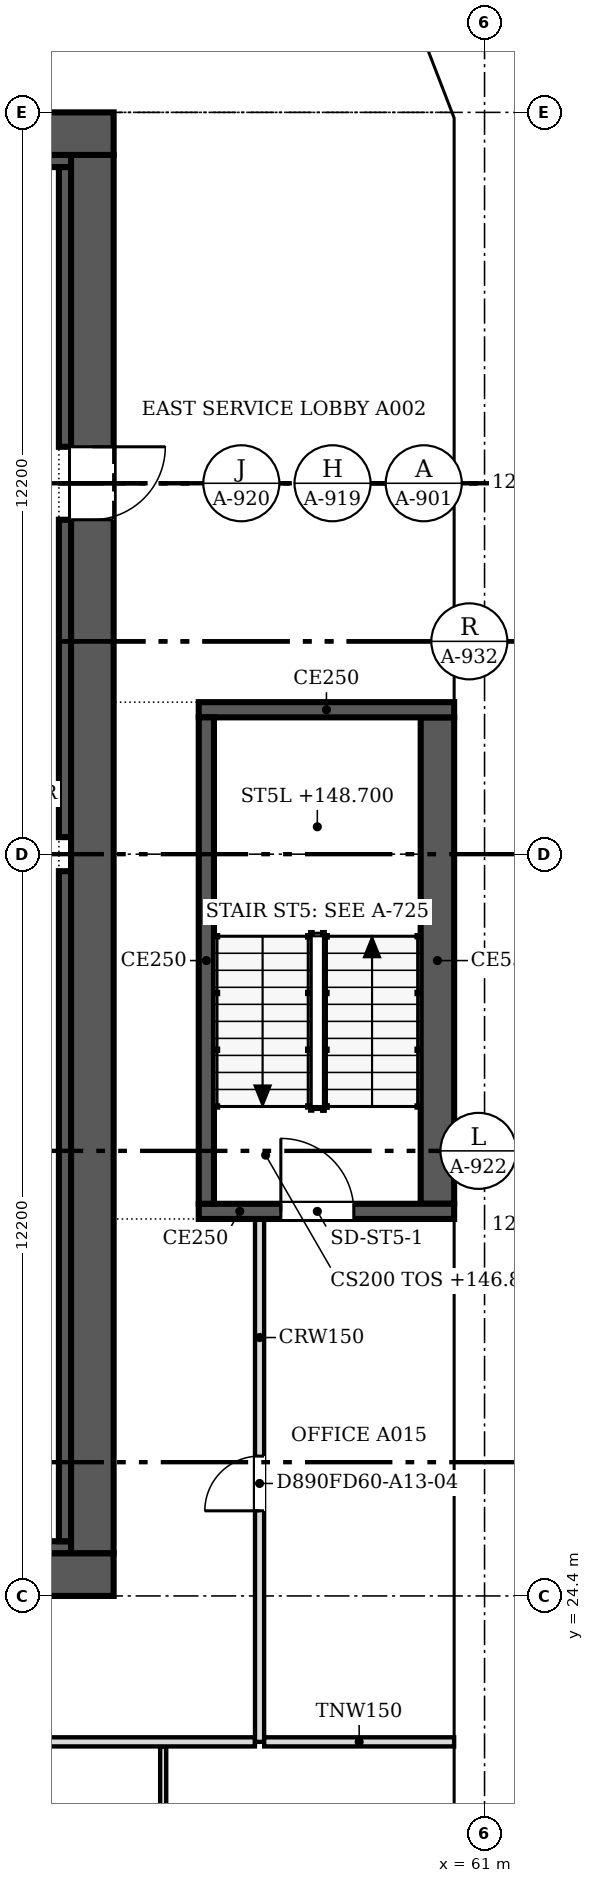
"""IFC4 building model, lengths in metres.
Left out: names, types, materials, properties, quantities, classifications, styles, units other than length and angle.
Written with IfcOpenShell. Run it as: python <this file> out.ifc"""

import sys

from ifc_helpers import new_model, si_unit, direction, frame, frame_2d, origin, place, context, subcontext, project, spatial, polyline, rectangle, outline, extrude, faceted_brep, source, transform, mapped, element, fill, save


model = new_model("IFC4")
c1 = context("Model", 3, precision=1e-05, world=origin(), true_north=direction((0.0, 1.0)))
c2 = subcontext(c1, "Body", "Model", "MODEL_VIEW")
j1 = project(units=[si_unit("LENGTHUNIT", "METRE"), si_unit("PLANEANGLEUNIT", "RADIAN")], contexts=[c1])
p1 = place(None, origin())
s1 = spatial("IfcSite", under=j1, at=p1, CompositionType="ELEMENT")
p2 = place(p1, origin())
s2 = spatial("IfcBuilding", under=s1, at=p2, CompositionType="ELEMENT")
p3 = place(p2, frame((0.0, 0.0, 146.8)))
s3 = spatial("IfcBuildingStorey", under=s2, at=p3, CompositionType="ELEMENT", Elevation=146.8)
m1 = source(origin(), c2, "Body", "SweptSolid", [
    extrude(outline(polyline([(3.05, 0.0), (6.1, 3.8), (3.05, 7.6), (0.0, 3.8), (3.05, 0.0)])), frame((0.0, 0.25, 0.0), z_axis=(0.0, -1.0, 0.0), x_axis=(1.0, 0.0, 0.0)), (0.0, 0.0, 1.0), 0.5),
])
p4 = place(p3, frame((60.75, 15.25, -3.8), z_axis=(0.0, 0.0, 1.0), x_axis=(0.0, 1.0, 0.0)))
e1 = element("IfcWall", 1, at=p4, inside=s3, PredefinedType="SOLIDWALL", context=c2, shape_type="MappedRepresentation", body=[
    mapped(m1, transform((0.0, 0.0, 0.0), scale=1.0)),
])
m2 = source(origin(), c2, "Body", "SweptSolid", [
    extrude(outline(polyline([(3.05, 0.399), (5.78, 3.8), (3.05, 7.201), (0.321, 3.8), (3.05, 0.399)])), frame((0.0, 0.26, 0.0), z_axis=(0.0, -1.0, 0.0), x_axis=(1.0, 0.0, 0.0)), (0.0, 0.0, 1.0), 0.52),
])
p5 = place(p4, origin())
e2 = element("IfcOpeningElement", 2, at=p5, cuts=e1, PredefinedType="OPENING", context=c2, shape_type="MappedRepresentation", body=[
    mapped(m2, transform((0.0, 0.0, 0.0), scale=1.0)),
])
m3 = source(origin(), c2, "Body", "Brep", [
    faceted_brep([(3.05, -0.25, 0.0), (6.1, -0.25, 3.8), (6.1, -0.25, 3.8), (3.05, -0.25, 7.6), (0.0, -0.25, 3.8), (0.0, 0.25, 3.8), (3.05, 0.25, 7.6), (6.1, 0.25, 3.8), (6.1, 0.25, 3.8), (3.05, 0.25, 0.0)], [[[0, 1, 2, 3, 4]], [[5, 6, 7, 8, 9]], [[9, 8, 1, 0]], [[7, 6, 3, 2]], [[6, 5, 4, 3]], [[5, 9, 0, 4]], [[1, 8, 7, 2]]]),
])
p6 = place(p3, frame((60.75, 21.35, -3.8), z_axis=(0.0, 0.0, 1.0), x_axis=(0.0, 1.0, 0.0)))
e3 = element("IfcWall", 3, at=p6, inside=s3, PredefinedType="SOLIDWALL", context=c2, shape_type="MappedRepresentation", body=[
    mapped(m3, transform((0.0, 0.0, 0.0), scale=1.0)),
])
p7 = place(p6, origin())
e4 = element("IfcOpeningElement", 4, at=p7, cuts=e3, PredefinedType="OPENING", context=c2, shape_type="MappedRepresentation", body=[
    mapped(m2, transform((0.0, 0.0, 0.0), scale=1.0)),
])
p8 = place(p3, frame((60.75, 27.45, -3.8), z_axis=(0.0, 0.0, 1.0), x_axis=(0.0, 1.0, 0.0)))
e5 = element("IfcWall", 5, at=p8, inside=s3, PredefinedType="SOLIDWALL", context=c2, shape_type="MappedRepresentation", body=[
    mapped(m1, transform((0.0, 0.0, 0.0), scale=1.0)),
])
p9 = place(p8, origin())
e6 = element("IfcOpeningElement", 6, at=p9, cuts=e5, PredefinedType="OPENING", context=c2, shape_type="MappedRepresentation", body=[
    mapped(m2, transform((0.0, 0.0, 0.0), scale=1.0)),
])
p10 = place(p3, frame((60.75, 33.55, -3.8), z_axis=(0.0, 0.0, 1.0), x_axis=(0.0, 1.0, 0.0)))
e7 = element("IfcWall", 7, at=p10, inside=s3, PredefinedType="SOLIDWALL", context=c2, shape_type="MappedRepresentation", body=[
    mapped(m3, transform((0.0, 0.0, 0.0), scale=1.0)),
])
p11 = place(p10, origin())
e8 = element("IfcOpeningElement", 8, at=p11, cuts=e7, PredefinedType="OPENING", context=c2, shape_type="MappedRepresentation", body=[
    mapped(m2, transform((0.0, 0.0, 0.0), scale=1.0)),
])
p12 = place(p3, frame((60.75, 39.65, -3.8), z_axis=(0.0, 0.0, 1.0), x_axis=(0.0, 1.0, 0.0)))
e9 = element("IfcWall", 9, at=p12, inside=s3, PredefinedType="SOLIDWALL", context=c2, shape_type="MappedRepresentation", body=[
    mapped(m1, transform((0.0, 0.0, 0.0), scale=1.0)),
])
p13 = place(p12, origin())
e10 = element("IfcOpeningElement", 10, at=p13, cuts=e9, PredefinedType="OPENING", context=c2, shape_type="MappedRepresentation", body=[
    mapped(m2, transform((0.0, 0.0, 0.0), scale=1.0)),
])
m4 = source(origin(), c2, "Body", "Brep", [
    faceted_brep([(3.003, -0.25, 0.0), (3.05, -0.25, 0.06), (3.05, -0.25, 7.54), (3.003, -0.25, 7.6), (0.0, -0.25, 3.8), (0.0, 0.25, 3.8), (2.957, 0.25, 7.541), (2.957, 0.25, 0.059), (3.003, 0.0, 0.0), (3.003, 0.0, 7.6)], [[[0, 1, 2, 3, 4]], [[5, 6, 7]], [[1, 0, 8]], [[9, 3, 2]], [[6, 5, 4, 3, 9]], [[5, 7, 8, 0, 4]], [[1, 8, 7, 6, 9, 2]]]),
])
p14 = place(p3, frame((60.75, 45.75, -3.8), z_axis=(0.0, 0.0, 1.0), x_axis=(0.0, 1.0, 0.0)))
e11 = element("IfcWall", 11, at=p14, inside=s3, PredefinedType="SOLIDWALL", context=c2, shape_type="MappedRepresentation", body=[
    mapped(m4, transform((0.0, 0.0, 0.0), scale=1.0)),
])
m5 = source(origin(), c2, "Body", "SweptSolid", [
    extrude(outline(polyline([(2.803, 6.944), (0.319, 3.8), (2.803, 0.656), (2.803, 6.944)])), frame((0.0, 0.26, 0.0), z_axis=(0.0, -1.0, 0.0), x_axis=(1.0, 0.0, 0.0)), (0.0, 0.0, 1.0), 0.52),
])
p15 = place(p14, origin())
e12 = element("IfcOpeningElement", 12, at=p15, cuts=e11, PredefinedType="OPENING", context=c2, shape_type="MappedRepresentation", body=[
    mapped(m5, transform((0.0, 0.0, 0.0), scale=1.0)),
])
m6 = source(origin(), c2, "Body", "Brep", [
    faceted_brep([(0.047, -0.25, 0.0), (2.997, -0.25, 3.8), (0.047, -0.25, 7.6), (0.0, -0.25, 7.541), (0.0, -0.25, 0.059), (0.093, 0.25, 7.54), (2.944, 0.25, 3.868), (2.944, 0.25, 3.732), (0.093, 0.25, 0.06), (2.997, 0.0, 3.8), (0.047, 0.0, 0.0), (0.047, 0.0, 7.6)], [[[0, 1, 2, 3, 4]], [[5, 6, 7, 8]], [[8, 7, 9, 1, 0, 10]], [[6, 5, 11, 2, 1, 9]], [[3, 2, 11]], [[10, 0, 4]], [[8, 10, 4, 3, 11, 5]], [[9, 7, 6]]]),
])
p16 = place(p3, frame((60.767, 48.71, -3.8), z_axis=(0.0, 0.0, 1.0), x_axis=(-0.359901446078, 0.932990326376, 0.0)))
e13 = element("IfcWall", 13, at=p16, inside=s3, PredefinedType="SOLIDWALL", context=c2, shape_type="MappedRepresentation", body=[
    mapped(m6, transform((0.0, 0.0, 0.0), scale=1.0)),
])
m7 = source(origin(), c2, "Body", "SweptSolid", [
    extrude(outline(polyline([(0.247, 0.665), (2.681, 3.8), (0.247, 6.935), (0.247, 0.665)])), frame((0.0, 0.26, 0.0), z_axis=(0.0, -1.0, 0.0), x_axis=(1.0, 0.0, 0.0)), (0.0, 0.0, 1.0), 0.52),
])
p17 = place(p16, origin())
e14 = element("IfcOpeningElement", 14, at=p17, cuts=e13, PredefinedType="OPENING", context=c2, shape_type="MappedRepresentation", body=[
    mapped(m7, transform((0.0, 0.0, 0.0), scale=1.0)),
])
m8 = source(origin(), c2, "Body", "Brep", [
    faceted_brep([(3.05, -0.25, 0.0), (6.1, -0.25, 3.8), (6.1, -0.25, 3.8), (0.0, -0.25, 3.8), (0.0, 0.25, 3.8), (6.1, 0.25, 3.8), (6.1, 0.25, 3.8), (3.05, 0.25, 0.0)], [[[0, 1, 2, 3]], [[4, 5, 6, 7]], [[7, 6, 1, 0]], [[5, 4, 3, 2]], [[4, 7, 0, 3]], [[1, 6, 5, 2]]]),
])
p18 = place(p3, frame((60.75, 18.3, 0.0), z_axis=(0.0, 0.0, 1.0), x_axis=(0.0, 1.0, 0.0)))
e15 = element("IfcWall", 15, at=p18, inside=s3, PredefinedType="SOLIDWALL", context=c2, shape_type="MappedRepresentation", body=[
    mapped(m8, transform((0.0, 0.0, 0.0), scale=1.0)),
])
m9 = source(origin(), c2, "Body", "SweptSolid", [
    extrude(outline(polyline([(3.05, 0.399), (5.579, 3.55), (0.521, 3.55), (3.05, 0.399)])), frame((0.0, 0.26, 0.0), z_axis=(0.0, -1.0, 0.0), x_axis=(1.0, 0.0, 0.0)), (0.0, 0.0, 1.0), 0.52),
])
p19 = place(p18, origin())
e16 = element("IfcOpeningElement", 16, at=p19, cuts=e15, PredefinedType="OPENING", context=c2, shape_type="MappedRepresentation", body=[
    mapped(m9, transform((0.0, 0.0, 0.0), scale=1.0)),
])
m10 = source(origin(), c2, "Body", "SweptSolid", [
    extrude(outline(polyline([(3.05, 0.0), (6.1, 3.8), (0.0, 3.8), (3.05, 0.0)])), frame((0.0, 0.25, 0.0), z_axis=(0.0, -1.0, 0.0), x_axis=(1.0, 0.0, 0.0)), (0.0, 0.0, 1.0), 0.5),
])
p20 = place(p3, frame((60.75, 24.4, 0.0), z_axis=(0.0, 0.0, 1.0), x_axis=(0.0, 1.0, 0.0)))
e17 = element("IfcWall", 17, at=p20, inside=s3, PredefinedType="SOLIDWALL", context=c2, shape_type="MappedRepresentation", body=[
    mapped(m10, transform((0.0, 0.0, 0.0), scale=1.0)),
])
p21 = place(p20, origin())
e18 = element("IfcOpeningElement", 18, at=p21, cuts=e17, PredefinedType="OPENING", context=c2, shape_type="MappedRepresentation", body=[
    mapped(m9, transform((0.0, 0.0, 0.0), scale=1.0)),
])
p22 = place(p3, frame((60.75, 30.5, 0.0), z_axis=(0.0, 0.0, 1.0), x_axis=(0.0, 1.0, 0.0)))
e19 = element("IfcWall", 19, at=p22, inside=s3, PredefinedType="SOLIDWALL", context=c2, shape_type="MappedRepresentation", body=[
    mapped(m10, transform((0.0, 0.0, 0.0), scale=1.0)),
])
p23 = place(p22, origin())
e20 = element("IfcOpeningElement", 20, at=p23, cuts=e19, PredefinedType="OPENING", context=c2, shape_type="MappedRepresentation", body=[
    mapped(m9, transform((0.0, 0.0, 0.0), scale=1.0)),
])
p24 = place(p3, frame((60.75, 36.6, 0.0), z_axis=(0.0, 0.0, 1.0), x_axis=(0.0, 1.0, 0.0)))
e21 = element("IfcWall", 21, at=p24, inside=s3, PredefinedType="SOLIDWALL", context=c2, shape_type="MappedRepresentation", body=[
    mapped(m8, transform((0.0, 0.0, 0.0), scale=1.0)),
])
p25 = place(p24, origin())
e22 = element("IfcOpeningElement", 22, at=p25, cuts=e21, PredefinedType="OPENING", context=c2, shape_type="MappedRepresentation", body=[
    mapped(m9, transform((0.0, 0.0, 0.0), scale=1.0)),
])
m11 = source(origin(), c2, "Body", "Brep", [
    faceted_brep([(3.05, -0.25, 0.0), (6.053, -0.25, 3.8), (0.0, -0.25, 3.8), (0.0, 0.25, 3.8), (6.007, 0.25, 3.8), (6.007, 0.25, 3.741), (3.05, 0.25, 0.0), (6.053, 0.0, 3.8)], [[[0, 1, 2]], [[3, 4, 5, 6]], [[6, 5, 7, 1, 0]], [[4, 3, 2, 1, 7]], [[3, 6, 0, 2]], [[5, 4, 7]]]),
])
p26 = place(p3, frame((60.75, 42.7, 0.0), z_axis=(0.0, 0.0, 1.0), x_axis=(0.0, 1.0, 0.0)))
e23 = element("IfcWall", 23, at=p26, inside=s3, PredefinedType="SOLIDWALL", context=c2, shape_type="MappedRepresentation", body=[
    mapped(m11, transform((0.0, 0.0, 0.0), scale=1.0)),
])
m12 = source(origin(), c2, "Body", "SweptSolid", [
    extrude(outline(polyline([(3.049, 0.401), (5.537, 3.55), (0.521, 3.55), (3.049, 0.401)])), frame((0.0, 0.26, 0.0), z_axis=(0.0, -1.0, 0.0), x_axis=(1.0, 0.0, 0.0)), (0.0, 0.0, 1.0), 0.52),
])
p27 = place(p26, origin())
e24 = element("IfcOpeningElement", 24, at=p27, cuts=e23, PredefinedType="OPENING", context=c2, shape_type="MappedRepresentation", body=[
    mapped(m12, transform((0.0, 0.0, 0.0), scale=1.0)),
])
m13 = source(origin(), c2, "Body", "Brep", [
    faceted_brep([(2.95, -0.25, 0.0), (3.003, -0.25, 0.068), (3.003, -0.25, 3.8), (0.0, -0.25, 3.8), (0.047, 0.25, 3.8), (2.898, 0.25, 3.8), (2.898, 0.25, 0.068), (0.047, 0.25, 3.74), (2.95, 0.0, 0.0), (0.0, 0.0, 3.8)], [[[0, 1, 2, 3]], [[4, 5, 6, 7]], [[1, 0, 8]], [[5, 4, 9, 3, 2]], [[7, 6, 8, 0, 3, 9]], [[7, 9, 4]], [[1, 8, 6, 5, 2]]]),
])
p28 = place(p3, frame((60.75, 48.753, 0.0), z_axis=(0.0, 0.0, 1.0), x_axis=(-0.35992665181, 0.932980602862, 0.0)))
e25 = element("IfcWall", 25, at=p28, inside=s3, PredefinedType="SOLIDWALL", context=c2, shape_type="MappedRepresentation", body=[
    mapped(m13, transform((0.0, 0.0, 0.0), scale=1.0)),
])
m14 = source(origin(), c2, "Body", "SweptSolid", [
    extrude(outline(polyline([(2.75, 3.55), (0.511, 3.55), (2.75, 0.665), (2.75, 3.55)])), frame((0.0, 0.26, 0.0), z_axis=(0.0, -1.0, 0.0), x_axis=(1.0, 0.0, 0.0)), (0.0, 0.0, 1.0), 0.52),
])
p29 = place(p28, origin())
e26 = element("IfcOpeningElement", 26, at=p29, cuts=e25, PredefinedType="OPENING", context=c2, shape_type="MappedRepresentation", body=[
    mapped(m14, transform((0.0, 0.0, 0.0), scale=1.0)),
])
p30 = place(p3, frame((54.9, 24.75, 0.0), z_axis=(0.0, 0.0, 1.0), x_axis=(-1.0, 0.0, 0.0)))
e27 = element("IfcWall", 27, at=p30, inside=s3, PredefinedType="SHEAR", context=c2, shape_type="SweptSolid", body=[
    extrude(rectangle(XDim=24.4, YDim=0.7, at=frame_2d((12.2, 0.0))), origin(), (0.0, 0.0, 1.0), 3.8),
])
m15 = source(origin(), c2, "Body", "SweptSolid", [
    extrude(rectangle(XDim=1.2, YDim=2.1, at=frame_2d((0.6, 1.05))), frame((0.0, 0.36, 0.0), z_axis=(0.0, -1.0, 0.0), x_axis=(1.0, 0.0, 0.0)), (0.0, 0.0, 1.0), 0.72),
])
p31 = place(p30, frame((1.5, 0.0, 0.0)))
e28 = element("IfcOpeningElement", 28, at=p31, cuts=e27, PredefinedType="OPENING", context=c2, shape_type="MappedRepresentation", body=[
    mapped(m15, transform((0.0, 0.0, 0.0), scale=1.0)),
])
p32 = place(p3, frame((30.5, 48.45, 0.0), z_axis=(0.0, 0.0, 1.0), x_axis=(1.0, 0.0, 0.0)))
e29 = element("IfcWall", 29, at=p32, inside=s3, PredefinedType="SHEAR", context=c2, shape_type="SweptSolid", body=[
    extrude(rectangle(XDim=24.4, YDim=0.7, at=frame_2d((12.2, 0.0))), origin(), (0.0, 0.0, 1.0), 3.8),
])
p33 = place(p3, frame((54.55, 48.1, 0.0), z_axis=(0.0, 0.0, 1.0), x_axis=(0.0, -1.0, 0.0)))
e30 = element("IfcWall", 30, at=p33, inside=s3, PredefinedType="SHEAR", context=c2, shape_type="SweptSolid", body=[
    extrude(rectangle(XDim=23.0, YDim=0.7, at=frame_2d((11.5, 0.0))), origin(), (0.0, 0.0, 1.0), 3.8),
])
p34 = place(p33, frame((4.8, 0.0, 0.0)))
e31 = element("IfcOpeningElement", 31, at=p34, cuts=e30, PredefinedType="OPENING", context=c2, shape_type="MappedRepresentation", body=[
    mapped(m15, transform((0.0, 0.0, 0.0), scale=1.0)),
])
p35 = place(p3, frame((53.4, 25.2, 0.0), z_axis=(0.0, 0.0, 1.0), x_axis=(1.0, 0.0, 0.0)))
e32 = element("IfcWall", 32, at=p35, inside=s3, PredefinedType="SOLIDWALL", context=c2, shape_type="SweptSolid", body=[
    extrude(rectangle(XDim=0.8, YDim=0.2, at=frame_2d((0.4, 0.0))), origin(), (0.0, 0.0, 1.0), 3.8),
])
p36 = place(p3, frame((31.2, 48.0, 0.0), z_axis=(0.0, 0.0, 1.0), x_axis=(1.0, 0.0, 0.0)))
e33 = element("IfcWall", 33, at=p36, inside=s3, PredefinedType="SOLIDWALL", context=c2, shape_type="SweptSolid", body=[
    extrude(rectangle(XDim=23.0, YDim=0.2, at=frame_2d((11.5, 0.0))), origin(), (0.0, 0.0, 1.0), 3.8),
])
p37 = place(p3, frame((54.1, 25.3, 0.0), z_axis=(0.0, 0.0, 1.0), x_axis=(0.0, 1.0, 0.0)))
e34 = element("IfcWall", 34, at=p37, inside=s3, PredefinedType="SOLIDWALL", context=c2, shape_type="SweptSolid", body=[
    extrude(rectangle(XDim=11.02, YDim=0.2, at=frame_2d((5.51, 0.0))), origin(), (0.0, 0.0, 1.0), 3.8),
])
p38 = place(p3, frame((54.1, 36.88, 0.0), z_axis=(0.0, 0.0, 1.0), x_axis=(0.0, 1.0, 0.0)))
e35 = element("IfcWall", 35, at=p38, inside=s3, PredefinedType="SOLIDWALL", context=c2, shape_type="SweptSolid", body=[
    extrude(rectangle(XDim=5.22, YDim=0.2, at=frame_2d((2.61, 0.0))), origin(), (0.0, 0.0, 1.0), 3.8),
])
p39 = place(p3, frame((54.1, 43.3, 0.0), z_axis=(0.0, 0.0, 1.0), x_axis=(0.0, 1.0, 0.0)))
e36 = element("IfcWall", 36, at=p39, inside=s3, PredefinedType="SOLIDWALL", context=c2, shape_type="SweptSolid", body=[
    extrude(rectangle(XDim=4.6, YDim=0.2, at=frame_2d((2.3, 0.0))), origin(), (0.0, 0.0, 1.0), 3.8),
])
p40 = place(p3, frame((60.5, 30.725, 0.0), z_axis=(0.0, 0.0, 1.0), x_axis=(-1.0, 0.0, 0.0)))
e37 = element("IfcWall", 37, at=p40, inside=s3, PredefinedType="SOLIDWALL", context=c2, shape_type="SweptSolid", body=[
    extrude(rectangle(XDim=4.2, YDim=0.25, at=frame_2d((2.1, 0.0))), origin(), (0.0, 0.0, 1.0), 3.8),
])
m16 = source(origin(), c2, "Body", "SweptSolid", [
    extrude(rectangle(XDim=1.2, YDim=2.1, at=frame_2d((0.6, 1.05))), frame((0.0, 0.135, 0.0), z_axis=(0.0, -1.0, 0.0), x_axis=(1.0, 0.0, 0.0)), (0.0, 0.0, 1.0), 0.27),
])
p41 = place(p40, frame((1.65, 0.0, 0.0)))
e38 = element("IfcOpeningElement", 38, at=p41, cuts=e37, PredefinedType="OPENING", context=c2, shape_type="MappedRepresentation", body=[
    mapped(m16, transform((0.0, 0.0, 0.0), scale=1.0)),
])
p42 = place(p3, frame((56.425, 30.85, 0.0), z_axis=(0.0, 0.0, 1.0), x_axis=(0.0, 1.0, 0.0)))
e39 = element("IfcWall", 39, at=p42, inside=s3, PredefinedType="SOLIDWALL", context=c2, shape_type="SweptSolid", body=[
    extrude(rectangle(XDim=8.0, YDim=0.25, at=frame_2d((4.0, 0.0))), origin(), (0.0, 0.0, 1.0), 3.8),
])
p43 = place(p3, frame((56.3, 38.975, 0.0), z_axis=(0.0, 0.0, 1.0), x_axis=(1.0, 0.0, 0.0)))
e40 = element("IfcWall", 40, at=p43, inside=s3, PredefinedType="SOLIDWALL", context=c2, shape_type="SweptSolid", body=[
    extrude(rectangle(XDim=4.2, YDim=0.25, at=frame_2d((2.1, 0.0))), origin(), (0.0, 0.0, 1.0), 3.8),
])
p44 = place(p3, frame((60.225, 38.85, 0.0), z_axis=(0.0, 0.0, 1.0), x_axis=(0.0, -1.0, 0.0)))
e41 = element("IfcWall", 41, at=p44, inside=s3, PredefinedType="SOLIDWALL", context=c2, shape_type="SweptSolid", body=[
    extrude(rectangle(XDim=8.0, YDim=0.55, at=frame_2d((4.0, 0.0))), origin(), (0.0, 0.0, 1.0), 3.8),
])
p45 = place(p3, frame((55.715, 21.924, 0.0), z_axis=(0.0, 0.0, 1.0), x_axis=(0.0, -1.0, 0.0)))
e42 = element("IfcWall", 42, at=p45, inside=s3, PredefinedType="PARTITIONING", context=c2, shape_type="SweptSolid", body=[
    extrude(rectangle(XDim=7.748, YDim=0.1, at=frame_2d((3.874, 0.0))), origin(), (0.0, 0.0, 1.0), 2.888),
])
m17 = source(origin(), c2, "Body", "SweptSolid", [
    extrude(rectangle(XDim=0.9, YDim=2.1, at=frame_2d((0.45, 1.05))), frame((0.0, 0.06, 0.0), z_axis=(0.0, -1.0, 0.0), x_axis=(1.0, 0.0, 0.0)), (0.0, 0.0, 1.0), 0.12),
])
p46 = place(p45, frame((3.448, 0.0, 0.0)))
e43 = element("IfcOpeningElement", 43, at=p46, cuts=e42, PredefinedType="OPENING", context=c2, shape_type="MappedRepresentation", body=[
    mapped(m17, transform((0.0, 0.0, 0.0), scale=1.0)),
])
p47 = place(p3, frame((46.4, 22.0, 0.0), z_axis=(0.0, 0.0, 1.0), x_axis=(1.0, 0.0, 0.0)))
e44 = element("IfcWall", 44, at=p47, inside=s3, PredefinedType="PARTITIONING", context=c2, shape_type="SweptSolid", body=[
    extrude(rectangle(XDim=10.824, YDim=0.15, at=frame_2d((5.412, 0.0))), origin(), (0.0, 0.0, 1.0), 2.888),
])
p48 = place(p3, frame((57.3, 30.6, 0.0), z_axis=(0.0, 0.0, 1.0), x_axis=(0.0, -1.0, 0.0)))
e45 = element("IfcWall", 45, at=p48, inside=s3, PredefinedType="PARTITIONING", context=c2, shape_type="SweptSolid", body=[
    extrude(rectangle(XDim=8.6, YDim=0.15, at=frame_2d((4.3, 0.0))), origin(), (0.0, 0.0, 1.0), 2.888),
])
m18 = source(origin(), c2, "Body", "SweptSolid", [
    extrude(rectangle(XDim=0.9, YDim=2.1, at=frame_2d((0.45, 1.05))), frame((0.0, 0.085, 0.0), z_axis=(0.0, -1.0, 0.0), x_axis=(1.0, 0.0, 0.0)), (0.0, 0.0, 1.0), 0.17),
])
p49 = place(p48, frame((3.9, 0.0, 0.0)))
e46 = element("IfcOpeningElement", 46, at=p49, cuts=e45, PredefinedType="OPENING", context=c2, shape_type="MappedRepresentation", body=[
    mapped(m18, transform((0.0, 0.0, 0.0), scale=1.0)),
])
p50 = place(p3, frame((57.376, 22.0, 0.0), z_axis=(0.0, 0.0, 1.0), x_axis=(1.0, 0.0, 0.0)))
e47 = element("IfcWall", 47, at=p50, inside=s3, PredefinedType="PARTITIONING", context=c2, shape_type="SweptSolid", body=[
    extrude(rectangle(XDim=3.124, YDim=0.15, at=frame_2d((1.562, 0.0))), origin(), (0.0, 0.0, 1.0), 2.888),
])
m19 = source(origin(), c2, "Body", "SweptSolid", [
    extrude(rectangle(XDim=1.2, YDim=2.1, at=frame_2d((0.6, 1.05))), frame((0.0, 0.025, 0.0), z_axis=(0.0, -1.0, 0.0), x_axis=(1.0, 0.0, 0.0)), (0.0, 0.0, 1.0), 0.05),
])
p51 = place(p34, origin())
e48 = element("IfcDoor", 48, at=p51, inside=s3, OperationType="SINGLE_SWING_LEFT", PredefinedType="DOOR", context=c2, shape_type="MappedRepresentation", body=[
    mapped(m19, transform((0.0, 0.0, 0.0), scale=1.0)),
])
fill(e31, e48)
p52 = place(p41, origin())
e49 = element("IfcDoor", 49, at=p52, inside=s3, OperationType="SINGLE_SWING_RIGHT", PredefinedType="DOOR", context=c2, shape_type="MappedRepresentation", body=[
    mapped(m19, transform((0.0, 0.0, 0.0), scale=1.0)),
])
fill(e38, e49)
m20 = source(origin(), c2, "Body", "SweptSolid", [
    extrude(rectangle(XDim=0.9, YDim=2.1, at=frame_2d((0.45, 1.05))), frame((0.0, 0.025, 0.0), z_axis=(0.0, -1.0, 0.0), x_axis=(1.0, 0.0, 0.0)), (0.0, 0.0, 1.0), 0.05),
])
p53 = place(p49, origin())
e50 = element("IfcDoor", 50, at=p53, inside=s3, OperationType="SINGLE_SWING_RIGHT", PredefinedType="DOOR", context=c2, shape_type="MappedRepresentation", body=[
    mapped(m20, transform((0.0, 0.0, 0.0), scale=1.0)),
])
fill(e46, e50)
save(model, sys.argv[1])
